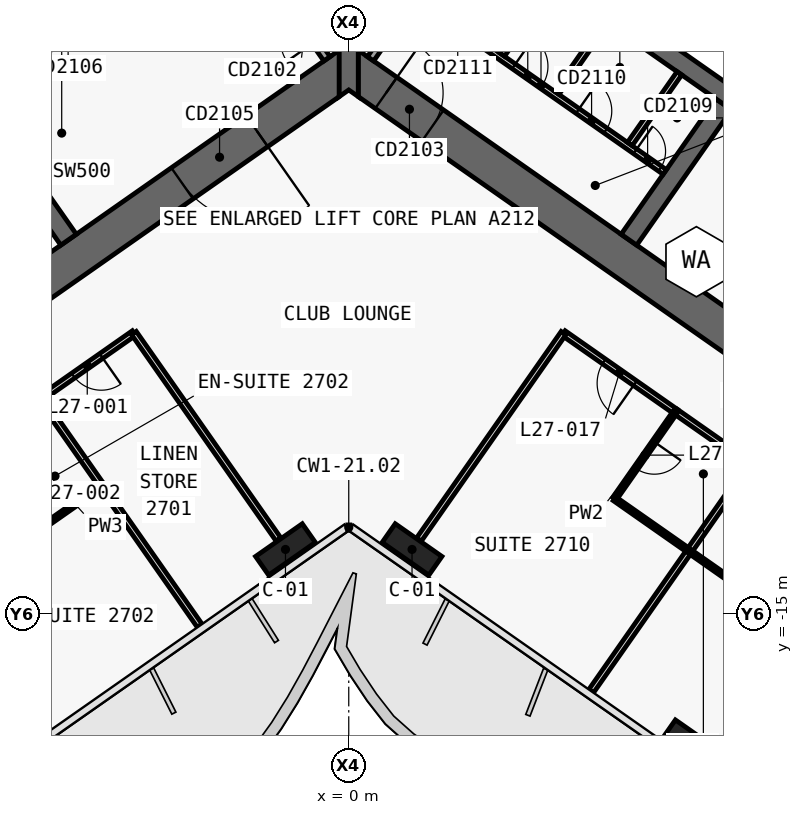
"""IFC4 building model, lengths in metres.
Left out: names, types, materials, properties, quantities, classifications, styles, units other than length and angle.
Written with IfcOpenShell. Run it as: python <this file> out.ifc"""

import sys

from ifc_helpers import new_model, si_unit, direction, frame, frame_2d, origin, origin_2d, place, context, subcontext, project, spatial, polyline, rectangle, outline, extrude, element, fill, save


model = new_model("IFC4")
c1 = context("Model", 3, precision=1e-05, world=origin(), true_north=direction((0.0, 1.0)))
c2 = subcontext(c1, "Body", "Model", "MODEL_VIEW")
j1 = project(units=[si_unit("LENGTHUNIT", "METRE"), si_unit("PLANEANGLEUNIT", "RADIAN")], contexts=[c1])
p1 = place(None, origin())
s1 = spatial("IfcSite", under=j1, at=p1, CompositionType="ELEMENT")
p2 = place(p1, origin())
s2 = spatial("IfcBuilding", under=s1, at=p2, CompositionType="ELEMENT")
p3 = place(p2, frame((0.0, 0.0, 122.9)))
s3 = spatial("IfcBuildingStorey", under=s2, at=p3, CompositionType="ELEMENT", Elevation=122.9)
p4 = place(p3, frame((0.037, 11.867, 0.0), z_axis=(0.0, 0.0, 1.0), x_axis=(-0.819155306259, -0.573571777746, 0.0)))
e1 = element("IfcWall", 1, at=p4, inside=s3, PredefinedType="SHEAR", context=c2, shape_type="SweptSolid", body=[
    extrude(outline(polyline([(33.837, 0.5), (0.7, 0.5), (0.0, -0.5), (33.837, -0.5), (33.837, 0.5)])), origin(), (0.0, 0.0, 1.0), 3.6),
])
p5 = place(p3, frame((0.037, -0.585, 0.0), z_axis=(0.0, 0.0, 1.0), x_axis=(-0.819157152511, -0.573569140985, 0.0)))
e2 = element("IfcWall", 2, at=p5, inside=s3, PredefinedType="SHEAR", context=c2, shape_type="SweptSolid", body=[
    extrude(outline(polyline([(26.695, 0.5), (0.7, 0.5), (0.0, -0.5), (26.695, -0.5), (26.695, 0.5)])), origin(), (0.0, 0.0, 1.0), 3.6),
])
p6 = place(p5, frame((2.995, 0.0, 0.0)))
e3 = element("IfcOpeningElement", 3, at=p6, cuts=e2, PredefinedType="OPENING", context=c2, shape_type="SweptSolid", body=[
    extrude(rectangle(XDim=2.4, YDim=2.1, at=frame_2d((1.2, 1.05))), frame((0.0, 0.51, 0.0), z_axis=(0.0, -1.0, 0.0), x_axis=(1.0, 0.0, 0.0)), (0.0, 0.0, 1.0), 1.02),
])
p7 = place(p5, frame((11.995, 0.0, 0.0)))
e4 = element("IfcOpeningElement", 4, at=p7, cuts=e2, PredefinedType="OPENING", context=c2, shape_type="SweptSolid", body=[
    extrude(rectangle(XDim=2.4, YDim=2.1, at=frame_2d((1.2, 1.05))), frame((0.0, 0.51, 0.0), z_axis=(0.0, -1.0, 0.0), x_axis=(1.0, 0.0, 0.0)), (0.0, 0.0, 1.0), 1.02),
])
p8 = place(p3, frame((-7.372, -5.162, 0.0), z_axis=(0.0, 0.0, 1.0), x_axis=(-0.573594173421, 0.819139624372, 0.0)))
e5 = element("IfcWall", 5, at=p8, inside=s3, PredefinedType="SHEAR", context=c2, shape_type="SweptSolid", body=[
    extrude(outline(polyline([(4.35, 0.25), (0.0, 0.25), (0.0, -0.25), (4.35, -0.25), (4.35, 0.25)])), origin(), (0.0, 0.0, 1.0), 3.6),
])
p9 = place(p3, frame((-2.638, 3.768, 0.0), z_axis=(0.0, 0.0, 1.0), x_axis=(-0.819148977158, -0.573580816643, 0.0)))
e6 = element("IfcWall", 6, at=p9, inside=s3, PredefinedType="SHEAR", context=c2, shape_type="SweptSolid", body=[
    extrude(outline(polyline([(26.0, 0.25), (0.0, 0.25), (0.0, -0.25), (26.0, -0.25), (26.0, 0.25)])), origin(), (0.0, 0.0, 1.0), 3.6),
])
p10 = place(p9, frame((1.169, 0.0, 0.0)))
e7 = element("IfcOpeningElement", 7, at=p10, cuts=e6, PredefinedType="OPENING", context=c2, shape_type="SweptSolid", body=[
    extrude(rectangle(XDim=1.1, YDim=2.1, at=frame_2d((0.55, 1.05))), frame((0.0, 0.26, 0.0), z_axis=(0.0, -1.0, 0.0), x_axis=(1.0, 0.0, 0.0)), (0.0, 0.0, 1.0), 0.52),
])
p11 = place(p9, frame((3.206, 0.0, 0.0)))
e8 = element("IfcOpeningElement", 8, at=p11, cuts=e6, PredefinedType="OPENING", context=c2, shape_type="SweptSolid", body=[
    extrude(rectangle(XDim=1.1, YDim=2.1, at=frame_2d((0.55, 1.05))), frame((0.0, 0.26, 0.0), z_axis=(0.0, -1.0, 0.0), x_axis=(1.0, 0.0, 0.0)), (0.0, 0.0, 1.0), 0.52),
])
p12 = place(p9, frame((5.244, 0.0, 0.0)))
e9 = element("IfcOpeningElement", 9, at=p12, cuts=e6, PredefinedType="OPENING", context=c2, shape_type="SweptSolid", body=[
    extrude(rectangle(XDim=1.1, YDim=2.1, at=frame_2d((0.55, 1.05))), frame((0.0, 0.26, 0.0), z_axis=(0.0, -1.0, 0.0), x_axis=(1.0, 0.0, 0.0)), (0.0, 0.0, 1.0), 0.52),
])
p13 = place(p9, frame((7.281, 0.0, 0.0)))
e10 = element("IfcOpeningElement", 10, at=p13, cuts=e6, PredefinedType="OPENING", context=c2, shape_type="SweptSolid", body=[
    extrude(rectangle(XDim=1.1, YDim=2.1, at=frame_2d((0.55, 1.05))), frame((0.0, 0.26, 0.0), z_axis=(0.0, -1.0, 0.0), x_axis=(1.0, 0.0, 0.0)), (0.0, 0.0, 1.0), 0.52),
])
p14 = place(p9, frame((9.688, 0.0, 0.0)))
e11 = element("IfcOpeningElement", 11, at=p14, cuts=e6, PredefinedType="OPENING", context=c2, shape_type="SweptSolid", body=[
    extrude(rectangle(XDim=1.1, YDim=2.1, at=frame_2d((0.55, 1.05))), frame((0.0, 0.26, 0.0), z_axis=(0.0, -1.0, 0.0), x_axis=(1.0, 0.0, 0.0)), (0.0, 0.0, 1.0), 0.52),
])
p15 = place(p9, frame((11.863, 0.0, 0.0)))
e12 = element("IfcOpeningElement", 12, at=p15, cuts=e6, PredefinedType="OPENING", context=c2, shape_type="SweptSolid", body=[
    extrude(rectangle(XDim=1.1, YDim=2.1, at=frame_2d((0.55, 1.05))), frame((0.0, 0.26, 0.0), z_axis=(0.0, -1.0, 0.0), x_axis=(1.0, 0.0, 0.0)), (0.0, 0.0, 1.0), 0.52),
])
p16 = place(p9, frame((14.038, 0.0, 0.0)))
e13 = element("IfcOpeningElement", 13, at=p16, cuts=e6, PredefinedType="OPENING", context=c2, shape_type="SweptSolid", body=[
    extrude(rectangle(XDim=1.1, YDim=2.1, at=frame_2d((0.55, 1.05))), frame((0.0, 0.26, 0.0), z_axis=(0.0, -1.0, 0.0), x_axis=(1.0, 0.0, 0.0)), (0.0, 0.0, 1.0), 0.52),
])
p17 = place(p9, frame((16.212, 0.0, 0.0)))
e14 = element("IfcOpeningElement", 14, at=p17, cuts=e6, PredefinedType="OPENING", context=c2, shape_type="SweptSolid", body=[
    extrude(rectangle(XDim=1.1, YDim=2.1, at=frame_2d((0.55, 1.05))), frame((0.0, 0.26, 0.0), z_axis=(0.0, -1.0, 0.0), x_axis=(1.0, 0.0, 0.0)), (0.0, 0.0, 1.0), 0.52),
])
p18 = place(p3, frame((-0.037, 11.867, 0.0), z_axis=(0.0, 0.0, 1.0), x_axis=(0.819155306259, -0.573571777746, 0.0)))
e15 = element("IfcWall", 15, at=p18, inside=s3, PredefinedType="SHEAR", context=c2, shape_type="SweptSolid", body=[
    extrude(outline(polyline([(33.837, 0.5), (0.0, 0.5), (0.7, -0.5), (33.837, -0.5), (33.837, 0.5)])), origin(), (0.0, 0.0, 1.0), 3.6),
])
p19 = place(p3, frame((-0.037, -0.585, 0.0), z_axis=(0.0, 0.0, 1.0), x_axis=(0.819157152511, -0.573569140985, 0.0)))
e16 = element("IfcWall", 16, at=p19, inside=s3, PredefinedType="SHEAR", context=c2, shape_type="SweptSolid", body=[
    extrude(outline(polyline([(26.695, 0.5), (0.0, 0.5), (0.7, -0.5), (26.695, -0.5), (26.695, 0.5)])), origin(), (0.0, 0.0, 1.0), 3.6),
])
p20 = place(p19, frame((1.245, 0.0, 0.0)))
e17 = element("IfcOpeningElement", 17, at=p20, cuts=e16, PredefinedType="OPENING", context=c2, shape_type="SweptSolid", body=[
    extrude(rectangle(XDim=1.5, YDim=2.1, at=frame_2d((0.75, 1.05))), frame((0.0, 0.51, 0.0), z_axis=(0.0, -1.0, 0.0), x_axis=(1.0, 0.0, 0.0)), (0.0, 0.0, 1.0), 1.02),
])
p21 = place(p19, frame((12.445, 0.0, 0.0)))
e18 = element("IfcOpeningElement", 18, at=p21, cuts=e16, PredefinedType="OPENING", context=c2, shape_type="SweptSolid", body=[
    extrude(rectangle(XDim=1.5, YDim=2.1, at=frame_2d((0.75, 1.05))), frame((0.0, 0.51, 0.0), z_axis=(0.0, -1.0, 0.0), x_axis=(1.0, 0.0, 0.0)), (0.0, 0.0, 1.0), 1.02),
])
p22 = place(p3, frame((7.372, -5.162, 0.0), z_axis=(0.0, 0.0, 1.0), x_axis=(0.573594173421, 0.819139624372, 0.0)))
e19 = element("IfcWall", 19, at=p22, inside=s3, PredefinedType="SHEAR", context=c2, shape_type="SweptSolid", body=[
    extrude(outline(polyline([(0.0, 0.25), (0.0, -0.25), (4.35, -0.25), (4.35, 0.25), (0.0, 0.25)])), origin(), (0.0, 0.0, 1.0), 3.6),
])
p23 = place(p3, frame((2.638, 3.768, 0.0), z_axis=(0.0, 0.0, 1.0), x_axis=(0.819148977158, -0.573580816643, 0.0)))
e20 = element("IfcWall", 20, at=p23, inside=s3, PredefinedType="SHEAR", context=c2, shape_type="SweptSolid", body=[
    extrude(outline(polyline([(0.0, 0.25), (0.0, -0.25), (26.0, -0.25), (26.0, 0.25), (0.0, 0.25)])), origin(), (0.0, 0.0, 1.0), 3.6),
])
p24 = place(p23, frame((9.637, 0.0, 0.0)))
e21 = element("IfcOpeningElement", 21, at=p24, cuts=e20, PredefinedType="OPENING", context=c2, shape_type="SweptSolid", body=[
    extrude(rectangle(XDim=1.2, YDim=2.1, at=frame_2d((0.6, 1.05))), frame((0.0, 0.26, 0.0), z_axis=(0.0, -1.0, 0.0), x_axis=(1.0, 0.0, 0.0)), (0.0, 0.0, 1.0), 0.52),
])
p25 = place(p23, frame((11.812, 0.0, 0.0)))
e22 = element("IfcOpeningElement", 22, at=p25, cuts=e20, PredefinedType="OPENING", context=c2, shape_type="SweptSolid", body=[
    extrude(rectangle(XDim=1.2, YDim=2.1, at=frame_2d((0.6, 1.05))), frame((0.0, 0.26, 0.0), z_axis=(0.0, -1.0, 0.0), x_axis=(1.0, 0.0, 0.0)), (0.0, 0.0, 1.0), 0.52),
])
p26 = place(p23, frame((13.988, 0.0, 0.0)))
e23 = element("IfcOpeningElement", 23, at=p26, cuts=e20, PredefinedType="OPENING", context=c2, shape_type="SweptSolid", body=[
    extrude(rectangle(XDim=1.2, YDim=2.1, at=frame_2d((0.6, 1.05))), frame((0.0, 0.26, 0.0), z_axis=(0.0, -1.0, 0.0), x_axis=(1.0, 0.0, 0.0)), (0.0, 0.0, 1.0), 0.52),
])
p27 = place(p23, frame((16.262, 0.0, 0.0)))
e24 = element("IfcOpeningElement", 24, at=p27, cuts=e20, PredefinedType="OPENING", context=c2, shape_type="SweptSolid", body=[
    extrude(rectangle(XDim=1.0, YDim=2.1, at=frame_2d((0.5, 1.05))), frame((0.0, 0.26, 0.0), z_axis=(0.0, -1.0, 0.0), x_axis=(1.0, 0.0, 0.0)), (0.0, 0.0, 1.0), 0.52),
])
p28 = place(p3, frame((0.0, -1.396, 0.0), z_axis=(0.0, 0.0, 1.0), x_axis=(0.0, 1.0, 0.0)))
e25 = element("IfcWall", 25, at=p28, inside=s3, PredefinedType="SHEAR", context=c2, shape_type="SweptSolid", body=[
    extrude(outline(polyline([(0.0, -0.25), (0.175, -0.25), (1.221, -0.25), (12.452, -0.25), (13.848, -0.25), (13.857, -0.25), (13.968, -0.172), (13.848, 0.0), (13.968, 0.172), (13.857, 0.25), (13.848, 0.25), (12.452, 0.25), (1.221, 0.25), (0.175, 0.25), (0.0, 0.25), (0.175, 0.0), (0.0, -0.25)])), origin(), (0.0, 0.0, 1.0), 3.6),
])
for number, where, z_axis, x_axis in (
    (26, (-1.665, -13.313, 0.0), (0.0, 0.0, 1.0), (-0.819, -0.574, 0.0)),
    (27, (1.665, -13.313, 0.0), (0.0, 0.0, 1.0), (0.819, -0.574, 0.0)),
    (28, (9.038, -18.475, 0.0), (0.0, 0.0, 1.0), (0.819, -0.574, 0.0)),
):
    element("IfcColumn", number, at=place(p3, frame(where, z_axis=z_axis, x_axis=x_axis)), inside=s3, PredefinedType="COLUMN", context=c2, shape_type="SweptSolid", body=[
        extrude(rectangle(XDim=1.5, YDim=0.6, at=origin_2d()), origin(), (0.0, 0.0, 1.0), 3.6),
    ])
p29 = place(p3, frame((1.802, 1.179, 0.0), z_axis=(0.0, 0.0, 1.0), x_axis=(0.819142461705, -0.573590121456, 0.0)))
e29 = element("IfcWall", 29, at=p29, inside=s3, PredefinedType="PARTITIONING", context=c2, shape_type="SweptSolid", body=[
    extrude(rectangle(XDim=7.95, YDim=0.15, at=frame_2d((3.975, 0.0))), origin(), (0.0, 0.0, 1.0), 3.32),
])
p30 = place(p29, frame((0.85, 0.0, 0.0)))
e30 = element("IfcOpeningElement", 30, at=p30, cuts=e29, PredefinedType="OPENING", context=c2, shape_type="SweptSolid", body=[
    extrude(rectangle(XDim=0.9, YDim=2.1, at=frame_2d((0.45, 1.05))), frame((0.0, 0.085, 0.0), z_axis=(0.0, -1.0, 0.0), x_axis=(1.0, 0.0, 0.0)), (0.0, 0.0, 1.0), 0.17),
])
p31 = place(p29, frame((3.1, 0.0, 0.0)))
e31 = element("IfcOpeningElement", 31, at=p31, cuts=e29, PredefinedType="OPENING", context=c2, shape_type="SweptSolid", body=[
    extrude(rectangle(XDim=0.9, YDim=2.1, at=frame_2d((0.45, 1.05))), frame((0.0, 0.085, 0.0), z_axis=(0.0, -1.0, 0.0), x_axis=(1.0, 0.0, 0.0)), (0.0, 0.0, 1.0), 0.17),
])
p32 = place(p29, frame((5.15, 0.0, 0.0)))
e32 = element("IfcOpeningElement", 32, at=p32, cuts=e29, PredefinedType="OPENING", context=c2, shape_type="SweptSolid", body=[
    extrude(rectangle(XDim=0.9, YDim=2.1, at=frame_2d((0.45, 1.05))), frame((0.0, 0.085, 0.0), z_axis=(0.0, -1.0, 0.0), x_axis=(1.0, 0.0, 0.0)), (0.0, 0.0, 1.0), 0.17),
])
p33 = place(p29, frame((7.0, 0.0, 0.0)))
e33 = element("IfcOpeningElement", 33, at=p33, cuts=e29, PredefinedType="OPENING", context=c2, shape_type="SweptSolid", body=[
    extrude(rectangle(XDim=0.8, YDim=2.1, at=frame_2d((0.4, 1.05))), frame((0.0, 0.085, 0.0), z_axis=(0.0, -1.0, 0.0), x_axis=(1.0, 0.0, 0.0)), (0.0, 0.0, 1.0), 0.17),
])
for number, where, z_axis, x_axis in (
    (34, (4.037, -0.293, 0.0), (0.0, 0.0, 1.0), (0.574, 0.819, 0.0)),
    (35, (5.47, -1.297, 0.0), (0.0, 0.0, 1.0), (0.574, 0.819, 0.0)),
    (36, (7.395, -2.645, 0.0), (0.0, 0.0, 1.0), (0.574, 0.819, 0.0)),
):
    element("IfcWall", number, at=place(p3, frame(where, z_axis=z_axis, x_axis=x_axis)), inside=s3, PredefinedType="PARTITIONING", context=c2, shape_type="SweptSolid", body=[
        extrude(rectangle(XDim=2.275, YDim=0.15, at=frame_2d((1.137, 0.0))), origin(), (0.0, 0.0, 1.0), 3.32),
    ])
p34 = place(p3, frame((-0.573, -0.402, 0.0), z_axis=(0.0, 0.0, 1.0), x_axis=(-0.57356780395, 0.819158088694, 0.0)))
e37 = element("IfcWall", 37, at=p34, inside=s3, PredefinedType="SOLIDWALL", context=c2, shape_type="SweptSolid", body=[
    extrude(rectangle(XDim=4.35, YDim=0.2, at=frame_2d((2.175, 0.0))), origin(), (0.0, 0.0, 1.0), 3.32),
])
p35 = place(p34, frame((0.55, 0.0, 0.0)))
e38 = element("IfcOpeningElement", 38, at=p35, cuts=e37, PredefinedType="OPENING", context=c2, shape_type="SweptSolid", body=[
    extrude(rectangle(XDim=0.9, YDim=2.1, at=frame_2d((0.45, 1.05))), frame((0.0, 0.11, 0.0), z_axis=(0.0, -1.0, 0.0), x_axis=(1.0, 0.0, 0.0)), (0.0, 0.0, 1.0), 0.22),
])
p36 = place(p3, frame((0.573, -0.402, 0.0), z_axis=(0.0, 0.0, 1.0), x_axis=(0.57356780395, 0.819158088694, 0.0)))
e39 = element("IfcWall", 39, at=p36, inside=s3, PredefinedType="SOLIDWALL", context=c2, shape_type="SweptSolid", body=[
    extrude(rectangle(XDim=4.35, YDim=0.2, at=frame_2d((2.175, 0.0))), origin(), (0.0, 0.0, 1.0), 3.32),
])
p37 = place(p36, frame((0.55, 0.0, 0.0)))
e40 = element("IfcOpeningElement", 40, at=p37, cuts=e39, PredefinedType="OPENING", context=c2, shape_type="SweptSolid", body=[
    extrude(rectangle(XDim=0.9, YDim=2.1, at=frame_2d((0.45, 1.05))), frame((0.0, 0.11, 0.0), z_axis=(0.0, -1.0, 0.0), x_axis=(1.0, 0.0, 0.0)), (0.0, 0.0, 1.0), 0.22),
])
p38 = place(p3, frame((8.601, -9.685, 0.0), z_axis=(0.0, 0.0, 1.0), x_axis=(-0.819149096931, 0.573580645591, 0.0)))
e41 = element("IfcWall", 41, at=p38, inside=s3, PredefinedType="PARTITIONING", context=c2, shape_type="SweptSolid", body=[
    extrude(rectangle(XDim=3.601, YDim=0.15, at=frame_2d((1.8, 0.0))), origin(), (0.0, 0.0, 1.0), 2.6),
])
p39 = place(p38, frame((1.301, 0.0, 0.0)))
e42 = element("IfcOpeningElement", 42, at=p39, cuts=e41, PredefinedType="OPENING", context=c2, shape_type="SweptSolid", body=[
    extrude(rectangle(XDim=1.0, YDim=2.1, at=frame_2d((0.5, 1.05))), frame((0.0, 0.085, 0.0), z_axis=(0.0, -1.0, 0.0), x_axis=(1.0, 0.0, 0.0)), (0.0, 0.0, 1.0), 0.17),
])
p40 = place(p3, frame((10.568, -11.062, 0.0), z_axis=(0.0, 0.0, 1.0), x_axis=(-0.819146032251, 0.573585022335, 0.0)))
e43 = element("IfcWall", 43, at=p40, inside=s3, PredefinedType="PARTITIONING", context=c2, shape_type="SweptSolid", body=[
    extrude(rectangle(XDim=2.404, YDim=0.15, at=frame_2d((1.202, 0.0))), origin(), (0.0, 0.0, 1.0), 3.32),
])
p41 = place(p3, frame((-5.652, -7.62, 0.0), z_axis=(0.0, 0.0, 1.0), x_axis=(-0.819132568355, -0.573604249862, 0.0)))
e44 = element("IfcWall", 44, at=p41, inside=s3, PredefinedType="PARTITIONING", context=c2, shape_type="SweptSolid", body=[
    extrude(rectangle(XDim=3.002, YDim=0.15, at=frame_2d((1.501, 0.0))), origin(), (0.0, 0.0, 1.0), 2.6),
])
p42 = place(p41, frame((1.051, 0.0, 0.0)))
e45 = element("IfcOpeningElement", 45, at=p42, cuts=e44, PredefinedType="OPENING", context=c2, shape_type="SweptSolid", body=[
    extrude(rectangle(XDim=0.9, YDim=2.1, at=frame_2d((0.45, 1.05))), frame((0.0, 0.085, 0.0), z_axis=(0.0, -1.0, 0.0), x_axis=(1.0, 0.0, 0.0)), (0.0, 0.0, 1.0), 0.17),
])
p43 = place(p3, frame((8.6, -9.684, 0.0), z_axis=(0.0, 0.0, 1.0), x_axis=(-0.573550118428, -0.819170471667, 0.0)))
e46 = element("IfcWall", 46, at=p43, inside=s3, PredefinedType="PARTITIONING", context=c2, shape_type="SweptSolid", body=[
    extrude(rectangle(XDim=2.8, YDim=0.12, at=frame_2d((1.4, 0.0))), origin(), (0.0, 0.0, 1.0), 3.32),
])
p44 = place(p43, frame((0.975, 0.0, 0.0)))
e47 = element("IfcOpeningElement", 47, at=p44, cuts=e46, PredefinedType="OPENING", context=c2, shape_type="SweptSolid", body=[
    extrude(rectangle(XDim=0.85, YDim=2.05, at=frame_2d((0.425, 1.025))), frame((0.0, 0.07, 0.0), z_axis=(0.0, -1.0, 0.0), x_axis=(1.0, 0.0, 0.0)), (0.0, 0.0, 1.0), 0.14),
])
p45 = place(p3, frame((6.994, -11.979, 0.0), z_axis=(0.0, 0.0, 1.0), x_axis=(0.819188907105, -0.573523787192, 0.0)))
e48 = element("IfcWall", 48, at=p45, inside=s3, PredefinedType="PARTITIONING", context=c2, shape_type="SweptSolid", body=[
    extrude(rectangle(XDim=2.4, YDim=0.12, at=frame_2d((1.2, 0.0))), origin(), (0.0, 0.0, 1.0), 3.32),
])
p46 = place(p3, frame((8.96, -13.355, 0.0), z_axis=(0.0, 0.0, 1.0), x_axis=(-0.573564311442, -0.819160534108, 0.0)))
e49 = element("IfcWall", 49, at=p46, inside=s3, PredefinedType="PARTITIONING", context=c2, shape_type="SweptSolid", body=[
    extrude(rectangle(XDim=4.499, YDim=0.15, at=frame_2d((2.25, 0.0))), origin(), (0.0, 0.0, 1.0), 2.5),
])
p47 = place(p3, frame((1.849, -13.051, 0.0), z_axis=(0.0, 0.0, 1.0), x_axis=(0.57357355307, 0.819154063177, 0.0)))
e50 = element("IfcWall", 50, at=p47, inside=s3, PredefinedType="PARTITIONING", context=c2, shape_type="SweptSolid", body=[
    extrude(rectangle(XDim=6.63, YDim=0.15, at=frame_2d((3.315, 0.0))), origin(), (0.0, 0.0, 1.0), 2.6),
])
p48 = place(p3, frame((10.567, -11.061, 0.0), z_axis=(0.0, 0.0, 1.0), x_axis=(-0.573608623498, -0.819129505664, 0.0)))
e51 = element("IfcWall", 51, at=p48, inside=s3, PredefinedType="PARTITIONING", context=c2, shape_type="SweptSolid", body=[
    extrude(rectangle(XDim=2.8, YDim=0.15, at=frame_2d((1.4, 0.0))), origin(), (0.0, 0.0, 1.0), 3.32),
])
p49 = place(p3, frame((8.96, -13.355, 0.0), z_axis=(0.0, 0.0, 1.0), x_axis=(0.819107643868, -0.573639841501, 0.0)))
e52 = element("IfcWall", 52, at=p49, inside=s3, PredefinedType="PARTITIONING", context=c2, shape_type="SweptSolid", body=[
    extrude(rectangle(XDim=2.4, YDim=0.12, at=frame_2d((1.2, 0.0))), origin(), (0.0, 0.0, 1.0), 3.32),
])
p50 = place(p3, frame((-1.849, -13.051, 0.0), z_axis=(0.0, 0.0, 1.0), x_axis=(-0.573575988258, 0.819152358047, 0.0)))
e53 = element("IfcWall", 53, at=p50, inside=s3, PredefinedType="PARTITIONING", context=c2, shape_type="SweptSolid", body=[
    extrude(rectangle(XDim=6.632, YDim=0.15, at=frame_2d((3.316, 0.0))), origin(), (0.0, 0.0, 1.0), 2.6),
])
p51 = place(p3, frame((-3.922, -15.32, 0.0), z_axis=(0.0, 0.0, 1.0), x_axis=(-0.573556991349, 0.819165659482, 0.0)))
e54 = element("IfcWall", 54, at=p51, inside=s3, PredefinedType="PARTITIONING", context=c2, shape_type="SweptSolid", body=[
    extrude(rectangle(XDim=4.501, YDim=0.15, at=frame_2d((2.25, 0.0))), origin(), (0.0, 0.0, 1.0), 2.5),
])
p52 = place(p3, frame((-6.502, -11.635, 0.0), z_axis=(0.0, 0.0, 1.0), x_axis=(-0.573596837309, 0.819137759006, 0.0)))
e55 = element("IfcWall", 55, at=p52, inside=s3, PredefinedType="PARTITIONING", context=c2, shape_type="SweptSolid", body=[
    extrude(rectangle(XDim=2.802, YDim=0.15, at=frame_2d((1.401, 0.0))), origin(), (0.0, 0.0, 1.0), 3.32),
])
p53 = place(p3, frame((-8.469, -13.011, 0.0), z_axis=(0.0, 0.0, 1.0), x_axis=(0.819141114317, 0.573592045652, 0.0)))
e56 = element("IfcWall", 56, at=p53, inside=s3, PredefinedType="PARTITIONING", context=c2, shape_type="SweptSolid", body=[
    extrude(rectangle(XDim=2.4, YDim=0.12, at=frame_2d((1.2, 0.0))), origin(), (0.0, 0.0, 1.0), 3.32),
])
p54 = place(p6, origin())
e57 = element("IfcDoor", 57, at=p54, inside=s3, OperationType="DOUBLE_DOOR_SINGLE_SWING", PredefinedType="DOOR", context=c2, shape_type="SweptSolid", body=[
    extrude(rectangle(XDim=2.4, YDim=2.1, at=frame_2d((1.2, 1.05))), frame((0.0, 0.025, 0.0), z_axis=(0.0, -1.0, 0.0), x_axis=(1.0, 0.0, 0.0)), (0.0, 0.0, 1.0), 0.05),
])
fill(e3, e57)
p55 = place(p31, origin())
e58 = element("IfcDoor", 58, at=p55, inside=s3, OperationType="SINGLE_SWING_RIGHT", PredefinedType="DOOR", context=c2, shape_type="SweptSolid", body=[
    extrude(rectangle(XDim=0.9, YDim=2.1, at=frame_2d((0.45, 1.05))), frame((0.0, 0.025, 0.0), z_axis=(0.0, -1.0, 0.0), x_axis=(1.0, 0.0, 0.0)), (0.0, 0.0, 1.0), 0.05),
])
fill(e31, e58)
p56 = place(p32, origin())
e59 = element("IfcDoor", 59, at=p56, inside=s3, OperationType="SINGLE_SWING_RIGHT", PredefinedType="DOOR", context=c2, shape_type="SweptSolid", body=[
    extrude(rectangle(XDim=0.9, YDim=2.1, at=frame_2d((0.45, 1.05))), frame((0.0, 0.025, 0.0), z_axis=(0.0, -1.0, 0.0), x_axis=(1.0, 0.0, 0.0)), (0.0, 0.0, 1.0), 0.05),
])
fill(e32, e59)
p57 = place(p33, origin())
e60 = element("IfcDoor", 60, at=p57, inside=s3, OperationType="SINGLE_SWING_RIGHT", PredefinedType="DOOR", context=c2, shape_type="SweptSolid", body=[
    extrude(rectangle(XDim=0.8, YDim=2.1, at=frame_2d((0.4, 1.05))), frame((0.0, 0.025, 0.0), z_axis=(0.0, -1.0, 0.0), x_axis=(1.0, 0.0, 0.0)), (0.0, 0.0, 1.0), 0.05),
])
fill(e33, e60)
p58 = place(p20, origin())
e61 = element("IfcDoor", 61, at=p58, inside=s3, OperationType="SINGLE_SWING_RIGHT", PredefinedType="DOOR", context=c2, shape_type="SweptSolid", body=[
    extrude(rectangle(XDim=1.5, YDim=2.1, at=frame_2d((0.75, 1.05))), frame((0.0, 0.025, 0.0), z_axis=(0.0, -1.0, 0.0), x_axis=(1.0, 0.0, 0.0)), (0.0, 0.0, 1.0), 0.05),
])
fill(e17, e61)
p59 = place(p42, origin())
e62 = element("IfcDoor", 62, at=p59, inside=s3, OperationType="SINGLE_SWING_RIGHT", PredefinedType="DOOR", context=c2, shape_type="SweptSolid", body=[
    extrude(rectangle(XDim=0.9, YDim=2.1, at=frame_2d((0.45, 1.05))), frame((0.0, 0.025, 0.0), z_axis=(0.0, -1.0, 0.0), x_axis=(1.0, 0.0, 0.0)), (0.0, 0.0, 1.0), 0.05),
])
fill(e45, e62)
p60 = place(p44, origin())
e63 = element("IfcDoor", 63, at=p60, inside=s3, OperationType="SINGLE_SWING_RIGHT", PredefinedType="DOOR", context=c2, shape_type="SweptSolid", body=[
    extrude(rectangle(XDim=0.85, YDim=2.05, at=frame_2d((0.425, 1.025))), frame((0.0, 0.025, 0.0), z_axis=(0.0, -1.0, 0.0), x_axis=(1.0, 0.0, 0.0)), (0.0, 0.0, 1.0), 0.05),
])
fill(e47, e63)
p61 = place(p39, origin())
e64 = element("IfcDoor", 64, at=p61, inside=s3, OperationType="SINGLE_SWING_LEFT", PredefinedType="DOOR", context=c2, shape_type="SweptSolid", body=[
    extrude(rectangle(XDim=1.0, YDim=2.1, at=frame_2d((0.5, 1.05))), frame((0.0, 0.025, 0.0), z_axis=(0.0, -1.0, 0.0), x_axis=(1.0, 0.0, 0.0)), (0.0, 0.0, 1.0), 0.05),
])
fill(e42, e64)
save(model, sys.argv[1])
